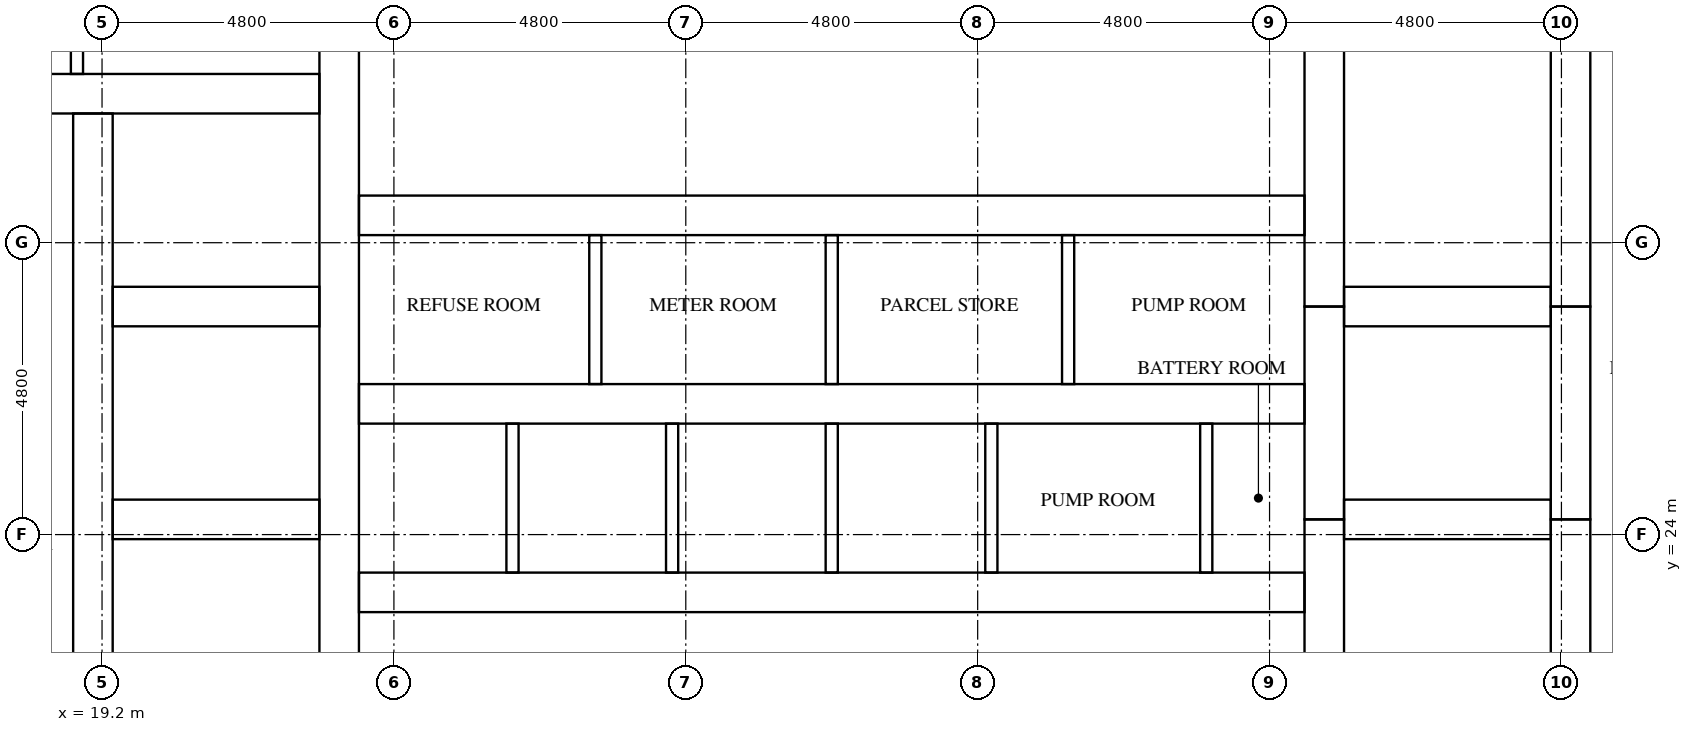
"""IFC4 building model, lengths in metres.
Left out: names, types, materials, properties, quantities, classifications, styles, units other than length and angle.
Written with IfcOpenShell. Run it as: python <this file> out.ifc"""

import sys

from ifc_helpers import new_model, si_unit, direction, frame, frame_2d, origin, place, context, subcontext, project, spatial, rectangle, extrude, element, fill, save


model = new_model("IFC4")
c1 = context("Model", 3, precision=1e-05, world=origin(), true_north=direction((0.0, 1.0)))
c2 = subcontext(c1, "Body", "Model", "MODEL_VIEW")
j1 = project(units=[si_unit("LENGTHUNIT", "METRE"), si_unit("PLANEANGLEUNIT", "RADIAN")], contexts=[c1])
p1 = place(None, origin())
s1 = spatial("IfcSite", under=j1, at=p1, CompositionType="ELEMENT")
p2 = place(p1, origin())
s2 = spatial("IfcBuilding", under=s1, at=p2, CompositionType="ELEMENT")
p3 = place(p2, frame((0.0, 0.0, 80.3)))
s3 = spatial("IfcBuildingStorey", under=s2, at=p3, CompositionType="ELEMENT", Elevation=80.3)
p4 = place(p3, frame((19.05, 15.9, 0.0), z_axis=(0.0, 0.0, 1.0), x_axis=(0.0, 1.0, 0.0)))
e1 = element("IfcWall", 1, at=p4, inside=s3, PredefinedType="SHEAR", context=c2, shape_type="SweptSolid", body=[
    extrude(rectangle(XDim=15.025, YDim=0.65, at=frame_2d((7.513, 0.0))), origin(), (0.0, 0.0, 1.0), 3.1),
])
p5 = place(p4, frame((9.55, 0.0, 0.0)))
e2 = element("IfcOpeningElement", 2, at=p5, cuts=e1, PredefinedType="OPENING", context=c2, shape_type="SweptSolid", body=[
    extrude(rectangle(XDim=1.1, YDim=2.1, at=frame_2d((0.55, 1.05))), frame((0.0, 0.335, 0.0), z_axis=(0.0, -1.0, 0.0), x_axis=(1.0, 0.0, 0.0)), (0.0, 0.0, 1.0), 0.67),
])
p6 = place(p4, frame((13.05, 0.0, 0.0)))
e3 = element("IfcOpeningElement", 3, at=p6, cuts=e1, PredefinedType="OPENING", context=c2, shape_type="SweptSolid", body=[
    extrude(rectangle(XDim=1.1, YDim=2.1, at=frame_2d((0.55, 1.05))), frame((0.0, 0.335, 0.0), z_axis=(0.0, -1.0, 0.0), x_axis=(1.0, 0.0, 0.0)), (0.0, 0.0, 1.0), 0.67),
])
p7 = place(p4, frame((0.3, 0.0, 0.0)))
e4 = element("IfcOpeningElement", 4, at=p7, cuts=e1, PredefinedType="OPENING", context=c2, shape_type="SweptSolid", body=[
    extrude(rectangle(XDim=1.2, YDim=2.1, at=frame_2d((0.6, 1.05))), frame((0.0, 0.335, 0.0), z_axis=(0.0, -1.0, 0.0), x_axis=(1.0, 0.0, 0.0)), (0.0, 0.0, 1.0), 0.67),
])
p8 = place(p3, frame((23.1, 15.9, 0.0), z_axis=(0.0, 0.0, 1.0), x_axis=(0.0, 1.0, 0.0)))
e5 = element("IfcWall", 5, at=p8, inside=s3, PredefinedType="SHEAR", context=c2, shape_type="SweptSolid", body=[
    extrude(rectangle(XDim=21.0, YDim=0.65, at=frame_2d((10.5, 0.0))), origin(), (0.0, 0.0, 1.0), 3.1),
])
p9 = place(p3, frame((39.3, 15.9, 0.0), z_axis=(0.0, 0.0, 1.0), x_axis=(0.0, 1.0, 0.0)))
e6 = element("IfcWall", 6, at=p9, inside=s3, PredefinedType="SHEAR", context=c2, shape_type="SweptSolid", body=[
    extrude(rectangle(XDim=8.35, YDim=0.65, at=frame_2d((4.175, 0.0))), origin(), (0.0, 0.0, 1.0), 3.1),
])
p10 = place(p3, frame((39.3, 24.25, 0.0), z_axis=(0.0, 0.0, 1.0), x_axis=(0.0, 1.0, 0.0)))
e7 = element("IfcWall", 7, at=p10, inside=s3, PredefinedType="SHEAR", context=c2, shape_type="SweptSolid", body=[
    extrude(rectangle(XDim=3.5, YDim=0.65, at=frame_2d((1.75, 0.0))), origin(), (0.0, 0.0, 1.0), 3.1),
])
p11 = place(p3, frame((39.3, 27.75, 0.0), z_axis=(0.0, 0.0, 1.0), x_axis=(0.0, 1.0, 0.0)))
e8 = element("IfcWall", 8, at=p11, inside=s3, PredefinedType="SHEAR", context=c2, shape_type="SweptSolid", body=[
    extrude(rectangle(XDim=9.15, YDim=0.65, at=frame_2d((4.575, 0.0))), origin(), (0.0, 0.0, 1.0), 3.1),
])
p12 = place(p3, frame((43.35, 15.9, 0.0), z_axis=(0.0, 0.0, 1.0), x_axis=(0.0, 1.0, 0.0)))
e9 = element("IfcWall", 9, at=p12, inside=s3, PredefinedType="SHEAR", context=c2, shape_type="SweptSolid", body=[
    extrude(rectangle(XDim=8.35, YDim=0.65, at=frame_2d((4.175, 0.0))), origin(), (0.0, 0.0, 1.0), 3.1),
])
p13 = place(p12, frame((0.3, 0.0, 0.0)))
e10 = element("IfcOpeningElement", 10, at=p13, cuts=e9, PredefinedType="OPENING", context=c2, shape_type="SweptSolid", body=[
    extrude(rectangle(XDim=1.2, YDim=2.1, at=frame_2d((0.6, 1.05))), frame((0.0, 0.335, 0.0), z_axis=(0.0, -1.0, 0.0), x_axis=(1.0, 0.0, 0.0)), (0.0, 0.0, 1.0), 0.67),
])
p14 = place(p3, frame((43.35, 24.25, 0.0), z_axis=(0.0, 0.0, 1.0), x_axis=(0.0, 1.0, 0.0)))
e11 = element("IfcWall", 11, at=p14, inside=s3, PredefinedType="SHEAR", context=c2, shape_type="SweptSolid", body=[
    extrude(rectangle(XDim=3.5, YDim=0.65, at=frame_2d((1.75, 0.0))), origin(), (0.0, 0.0, 1.0), 3.1),
])
p15 = place(p14, frame((1.2, 0.0, 0.0)))
e12 = element("IfcOpeningElement", 12, at=p15, cuts=e11, PredefinedType="OPENING", context=c2, shape_type="SweptSolid", body=[
    extrude(rectangle(XDim=1.1, YDim=2.1, at=frame_2d((0.55, 1.05))), frame((0.0, 0.335, 0.0), z_axis=(0.0, -1.0, 0.0), x_axis=(1.0, 0.0, 0.0)), (0.0, 0.0, 1.0), 0.67),
])
p16 = place(p3, frame((43.35, 27.75, 0.0), z_axis=(0.0, 0.0, 1.0), x_axis=(0.0, 1.0, 0.0)))
e13 = element("IfcWall", 13, at=p16, inside=s3, PredefinedType="SHEAR", context=c2, shape_type="SweptSolid", body=[
    extrude(rectangle(XDim=9.15, YDim=0.65, at=frame_2d((4.575, 0.0))), origin(), (0.0, 0.0, 1.0), 3.1),
])
p17 = place(p16, frame((7.65, 0.0, 0.0)))
e14 = element("IfcOpeningElement", 14, at=p17, cuts=e13, PredefinedType="OPENING", context=c2, shape_type="SweptSolid", body=[
    extrude(rectangle(XDim=1.2, YDim=2.1, at=frame_2d((0.6, 1.05))), frame((0.0, 0.335, 0.0), z_axis=(0.0, -1.0, 0.0), x_axis=(1.0, 0.0, 0.0)), (0.0, 0.0, 1.0), 0.67),
])
for number, where, z_axis, x_axis in (
    (15, (19.375, 24.25, 0.0), (0.0, 0.0, 1.0), (1.0, 0.0, 0.0)),
    (16, (19.375, 27.75, 0.0), (0.0, 0.0, 1.0), (1.0, 0.0, 0.0)),
):
    element("IfcWall", number, at=place(p3, frame(where, z_axis=z_axis, x_axis=x_axis)), inside=s3, PredefinedType="SHEAR", context=c2, shape_type="SweptSolid", body=[
        extrude(rectangle(XDim=3.4, YDim=0.65, at=frame_2d((1.7, 0.0))), origin(), (0.0, 0.0, 1.0), 3.1),
    ])
p18 = place(p3, frame((15.9, 31.25, 0.0), z_axis=(0.0, 0.0, 1.0), x_axis=(1.0, 0.0, 0.0)))
e17 = element("IfcWall", 17, at=p18, inside=s3, PredefinedType="SHEAR", context=c2, shape_type="SweptSolid", body=[
    extrude(rectangle(XDim=6.875, YDim=0.65, at=frame_2d((3.438, 0.0))), origin(), (0.0, 0.0, 1.0), 3.1),
])
for number, where, z_axis, x_axis in (
    (18, (39.625, 24.25, 0.0), (0.0, 0.0, 1.0), (1.0, 0.0, 0.0)),
    (19, (39.625, 27.75, 0.0), (0.0, 0.0, 1.0), (1.0, 0.0, 0.0)),
):
    element("IfcWall", number, at=place(p3, frame(where, z_axis=z_axis, x_axis=x_axis)), inside=s3, PredefinedType="SHEAR", context=c2, shape_type="SweptSolid", body=[
        extrude(rectangle(XDim=3.4, YDim=0.65, at=frame_2d((1.7, 0.0))), origin(), (0.0, 0.0, 1.0), 3.1),
    ])
p19 = place(p3, frame((23.425, 23.05, 0.0), z_axis=(0.0, 0.0, 1.0), x_axis=(1.0, 0.0, 0.0)))
e20 = element("IfcWall", 20, at=p19, inside=s3, PredefinedType="SHEAR", context=c2, shape_type="SweptSolid", body=[
    extrude(rectangle(XDim=15.55, YDim=0.65, at=frame_2d((7.775, 0.0))), origin(), (0.0, 0.0, 1.0), 3.1),
])
p20 = place(p19, frame((0.663, 0.0, 0.0)))
e21 = element("IfcOpeningElement", 21, at=p20, cuts=e20, PredefinedType="OPENING", context=c2, shape_type="SweptSolid", body=[
    extrude(rectangle(XDim=1.1, YDim=2.1, at=frame_2d((0.55, 1.05))), frame((0.0, 0.335, 0.0), z_axis=(0.0, -1.0, 0.0), x_axis=(1.0, 0.0, 0.0)), (0.0, 0.0, 1.0), 0.67),
])
p21 = place(p19, frame((3.288, 0.0, 0.0)))
e22 = element("IfcOpeningElement", 22, at=p21, cuts=e20, PredefinedType="OPENING", context=c2, shape_type="SweptSolid", body=[
    extrude(rectangle(XDim=1.1, YDim=2.1, at=frame_2d((0.55, 1.05))), frame((0.0, 0.335, 0.0), z_axis=(0.0, -1.0, 0.0), x_axis=(1.0, 0.0, 0.0)), (0.0, 0.0, 1.0), 0.67),
])
p22 = place(p19, frame((11.667, 0.0, 0.0)))
e23 = element("IfcOpeningElement", 23, at=p22, cuts=e20, PredefinedType="OPENING", context=c2, shape_type="SweptSolid", body=[
    extrude(rectangle(XDim=1.0, YDim=2.1, at=frame_2d((0.5, 1.05))), frame((0.0, 0.335, 0.0), z_axis=(0.0, -1.0, 0.0), x_axis=(1.0, 0.0, 0.0)), (0.0, 0.0, 1.0), 0.67),
])
p23 = place(p19, frame((14.292, 0.0, 0.0)))
e24 = element("IfcOpeningElement", 24, at=p23, cuts=e20, PredefinedType="OPENING", context=c2, shape_type="SweptSolid", body=[
    extrude(rectangle(XDim=1.0, YDim=2.1, at=frame_2d((0.5, 1.05))), frame((0.0, 0.335, 0.0), z_axis=(0.0, -1.0, 0.0), x_axis=(1.0, 0.0, 0.0)), (0.0, 0.0, 1.0), 0.67),
])
p24 = place(p3, frame((23.425, 26.15, 0.0), z_axis=(0.0, 0.0, 1.0), x_axis=(1.0, 0.0, 0.0)))
e25 = element("IfcWall", 25, at=p24, inside=s3, PredefinedType="SHEAR", context=c2, shape_type="SweptSolid", body=[
    extrude(rectangle(XDim=15.55, YDim=0.65, at=frame_2d((7.775, 0.0))), origin(), (0.0, 0.0, 1.0), 3.1),
])
p25 = place(p3, frame((23.425, 29.25, 0.0), z_axis=(0.0, 0.0, 1.0), x_axis=(1.0, 0.0, 0.0)))
e26 = element("IfcWall", 26, at=p25, inside=s3, PredefinedType="SHEAR", context=c2, shape_type="SweptSolid", body=[
    extrude(rectangle(XDim=15.55, YDim=0.65, at=frame_2d((7.775, 0.0))), origin(), (0.0, 0.0, 1.0), 3.1),
])
p26 = place(p25, frame((1.394, 0.0, 0.0)))
e27 = element("IfcOpeningElement", 27, at=p26, cuts=e26, PredefinedType="OPENING", context=c2, shape_type="SweptSolid", body=[
    extrude(rectangle(XDim=1.0, YDim=2.1, at=frame_2d((0.5, 1.05))), frame((0.0, 0.335, 0.0), z_axis=(0.0, -1.0, 0.0), x_axis=(1.0, 0.0, 0.0)), (0.0, 0.0, 1.0), 0.67),
])
p27 = place(p25, frame((5.331, 0.0, 0.0)))
e28 = element("IfcOpeningElement", 28, at=p27, cuts=e26, PredefinedType="OPENING", context=c2, shape_type="SweptSolid", body=[
    extrude(rectangle(XDim=1.0, YDim=2.1, at=frame_2d((0.5, 1.05))), frame((0.0, 0.335, 0.0), z_axis=(0.0, -1.0, 0.0), x_axis=(1.0, 0.0, 0.0)), (0.0, 0.0, 1.0), 0.67),
])
p28 = place(p25, frame((9.219, 0.0, 0.0)))
e29 = element("IfcOpeningElement", 29, at=p28, cuts=e26, PredefinedType="OPENING", context=c2, shape_type="SweptSolid", body=[
    extrude(rectangle(XDim=1.0, YDim=2.1, at=frame_2d((0.5, 1.05))), frame((0.0, 0.335, 0.0), z_axis=(0.0, -1.0, 0.0), x_axis=(1.0, 0.0, 0.0)), (0.0, 0.0, 1.0), 0.67),
])
p29 = place(p25, frame((13.156, 0.0, 0.0)))
e30 = element("IfcOpeningElement", 30, at=p29, cuts=e26, PredefinedType="OPENING", context=c2, shape_type="SweptSolid", body=[
    extrude(rectangle(XDim=1.0, YDim=2.1, at=frame_2d((0.5, 1.05))), frame((0.0, 0.335, 0.0), z_axis=(0.0, -1.0, 0.0), x_axis=(1.0, 0.0, 0.0)), (0.0, 0.0, 1.0), 0.67),
])
for number, where, z_axis, x_axis in (
    (31, (25.95, 23.375, 0.0), (0.0, 0.0, 1.0), (0.0, 1.0, 0.0)),
    (32, (28.575, 23.375, 0.0), (0.0, 0.0, 1.0), (0.0, 1.0, 0.0)),
    (33, (31.2, 23.375, 0.0), (0.0, 0.0, 1.0), (0.0, 1.0, 0.0)),
    (34, (33.825, 23.375, 0.0), (0.0, 0.0, 1.0), (0.0, 1.0, 0.0)),
):
    element("IfcWall", number, at=place(p3, frame(where, z_axis=z_axis, x_axis=x_axis)), inside=s3, PredefinedType="SOLIDWALL", context=c2, shape_type="SweptSolid", body=[
        extrude(rectangle(XDim=2.45, YDim=0.2, at=frame_2d((1.225, 0.0))), origin(), (0.0, 0.0, 1.0), 3.1),
    ])
p30 = place(p3, frame((18.788, 31.575, 0.0), z_axis=(0.0, 0.0, 1.0), x_axis=(0.0, 1.0, 0.0)))
e35 = element("IfcWall", 35, at=p30, inside=s3, PredefinedType="PARTITIONING", context=c2, shape_type="SweptSolid", body=[
    extrude(rectangle(XDim=5.325, YDim=0.2, at=frame_2d((2.663, 0.0))), origin(), (0.0, 0.0, 1.0), 3.1),
])
for number, where, z_axis, x_axis in (
    (36, (37.359, 23.375, 0.0), (0.0, 0.0, 1.0), (0.0, 1.0, 0.0)),
    (37, (27.312, 26.475, 0.0), (0.0, 0.0, 1.0), (0.0, 1.0, 0.0)),
    (38, (31.2, 26.475, 0.0), (0.0, 0.0, 1.0), (0.0, 1.0, 0.0)),
    (39, (35.087, 26.475, 0.0), (0.0, 0.0, 1.0), (0.0, 1.0, 0.0)),
):
    element("IfcWall", number, at=place(p3, frame(where, z_axis=z_axis, x_axis=x_axis)), inside=s3, PredefinedType="PARTITIONING", context=c2, shape_type="SweptSolid", body=[
        extrude(rectangle(XDim=2.45, YDim=0.2, at=frame_2d((1.225, 0.0))), origin(), (0.0, 0.0, 1.0), 3.1),
    ])
p31 = place(p20, origin())
e40 = element("IfcDoor", 40, at=p31, inside=s3, OperationType="DOUBLE_DOOR_SLIDING", PredefinedType="DOOR", context=c2, shape_type="SweptSolid", body=[
    extrude(rectangle(XDim=1.1, YDim=2.1, at=frame_2d((0.55, 1.05))), frame((0.0, 0.025, 0.0), z_axis=(0.0, -1.0, 0.0), x_axis=(1.0, 0.0, 0.0)), (0.0, 0.0, 1.0), 0.05),
])
fill(e21, e40)
p32 = place(p21, origin())
e41 = element("IfcDoor", 41, at=p32, inside=s3, OperationType="DOUBLE_DOOR_SLIDING", PredefinedType="DOOR", context=c2, shape_type="SweptSolid", body=[
    extrude(rectangle(XDim=1.1, YDim=2.1, at=frame_2d((0.55, 1.05))), frame((0.0, 0.025, 0.0), z_axis=(0.0, -1.0, 0.0), x_axis=(1.0, 0.0, 0.0)), (0.0, 0.0, 1.0), 0.05),
])
fill(e22, e41)
p33 = place(p5, origin())
e42 = element("IfcDoor", 42, at=p33, inside=s3, OperationType="DOUBLE_DOOR_SLIDING", PredefinedType="DOOR", context=c2, shape_type="SweptSolid", body=[
    extrude(rectangle(XDim=1.1, YDim=2.1, at=frame_2d((0.55, 1.05))), frame((0.0, 0.025, 0.0), z_axis=(0.0, -1.0, 0.0), x_axis=(1.0, 0.0, 0.0)), (0.0, 0.0, 1.0), 0.05),
])
fill(e2, e42)
p34 = place(p6, origin())
e43 = element("IfcDoor", 43, at=p34, inside=s3, OperationType="DOUBLE_DOOR_SLIDING", PredefinedType="DOOR", context=c2, shape_type="SweptSolid", body=[
    extrude(rectangle(XDim=1.1, YDim=2.1, at=frame_2d((0.55, 1.05))), frame((0.0, 0.025, 0.0), z_axis=(0.0, -1.0, 0.0), x_axis=(1.0, 0.0, 0.0)), (0.0, 0.0, 1.0), 0.05),
])
fill(e3, e43)
p35 = place(p15, origin())
e44 = element("IfcDoor", 44, at=p35, inside=s3, OperationType="DOUBLE_DOOR_SLIDING", PredefinedType="DOOR", context=c2, shape_type="SweptSolid", body=[
    extrude(rectangle(XDim=1.1, YDim=2.1, at=frame_2d((0.55, 1.05))), frame((0.0, 0.025, 0.0), z_axis=(0.0, -1.0, 0.0), x_axis=(1.0, 0.0, 0.0)), (0.0, 0.0, 1.0), 0.05),
])
fill(e12, e44)
p36 = place(p22, frame((1.0, 0.0, 0.0), z_axis=(0.0, 0.0, 1.0), x_axis=(-1.0, 0.0, 0.0)))
e45 = element("IfcDoor", 45, at=p36, inside=s3, OperationType="SINGLE_SWING_LEFT", PredefinedType="DOOR", context=c2, shape_type="SweptSolid", body=[
    extrude(rectangle(XDim=1.0, YDim=2.1, at=frame_2d((0.5, 1.05))), frame((0.0, 0.025, 0.0), z_axis=(0.0, -1.0, 0.0), x_axis=(1.0, 0.0, 0.0)), (0.0, 0.0, 1.0), 0.05),
])
fill(e23, e45)
p37 = place(p23, frame((1.0, 0.0, 0.0), z_axis=(0.0, 0.0, 1.0), x_axis=(-1.0, 0.0, 0.0)))
e46 = element("IfcDoor", 46, at=p37, inside=s3, OperationType="SINGLE_SWING_RIGHT", PredefinedType="DOOR", context=c2, shape_type="SweptSolid", body=[
    extrude(rectangle(XDim=1.0, YDim=2.1, at=frame_2d((0.5, 1.05))), frame((0.0, 0.025, 0.0), z_axis=(0.0, -1.0, 0.0), x_axis=(1.0, 0.0, 0.0)), (0.0, 0.0, 1.0), 0.05),
])
fill(e24, e46)
p38 = place(p26, origin())
e47 = element("IfcDoor", 47, at=p38, inside=s3, OperationType="SINGLE_SWING_LEFT", PredefinedType="DOOR", context=c2, shape_type="SweptSolid", body=[
    extrude(rectangle(XDim=1.0, YDim=2.1, at=frame_2d((0.5, 1.05))), frame((0.0, 0.025, 0.0), z_axis=(0.0, -1.0, 0.0), x_axis=(1.0, 0.0, 0.0)), (0.0, 0.0, 1.0), 0.05),
])
fill(e27, e47)
p39 = place(p27, origin())
e48 = element("IfcDoor", 48, at=p39, inside=s3, OperationType="SINGLE_SWING_RIGHT", PredefinedType="DOOR", context=c2, shape_type="SweptSolid", body=[
    extrude(rectangle(XDim=1.0, YDim=2.1, at=frame_2d((0.5, 1.05))), frame((0.0, 0.025, 0.0), z_axis=(0.0, -1.0, 0.0), x_axis=(1.0, 0.0, 0.0)), (0.0, 0.0, 1.0), 0.05),
])
fill(e28, e48)
p40 = place(p28, origin())
e49 = element("IfcDoor", 49, at=p40, inside=s3, OperationType="SINGLE_SWING_LEFT", PredefinedType="DOOR", context=c2, shape_type="SweptSolid", body=[
    extrude(rectangle(XDim=1.0, YDim=2.1, at=frame_2d((0.5, 1.05))), frame((0.0, 0.025, 0.0), z_axis=(0.0, -1.0, 0.0), x_axis=(1.0, 0.0, 0.0)), (0.0, 0.0, 1.0), 0.05),
])
fill(e29, e49)
p41 = place(p29, origin())
e50 = element("IfcDoor", 50, at=p41, inside=s3, OperationType="SINGLE_SWING_RIGHT", PredefinedType="DOOR", context=c2, shape_type="SweptSolid", body=[
    extrude(rectangle(XDim=1.0, YDim=2.1, at=frame_2d((0.5, 1.05))), frame((0.0, 0.025, 0.0), z_axis=(0.0, -1.0, 0.0), x_axis=(1.0, 0.0, 0.0)), (0.0, 0.0, 1.0), 0.05),
])
fill(e30, e50)
save(model, sys.argv[1])
